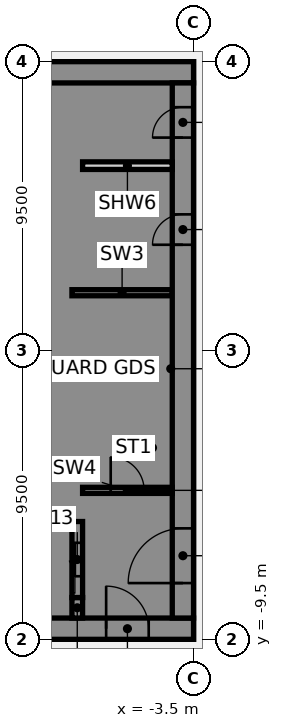
"""IFC4 building model, lengths in metres.
Left out: names, types, materials, properties, quantities, classifications, styles, units other than length and angle.
Written with IfcOpenShell. Run it as: python <this file> out.ifc"""

import sys

from ifc_helpers import new_model, si_unit, direction, frame, frame_2d, origin, place, context, subcontext, project, spatial, polyline, rectangle, outline, extrude, element, fill, save


model = new_model("IFC4")
c1 = context("Model", 3, precision=1e-05, world=origin(), true_north=direction((0.0, 1.0)))
c2 = subcontext(c1, "Body", "Model", "MODEL_VIEW")
j1 = project(units=[si_unit("LENGTHUNIT", "METRE"), si_unit("PLANEANGLEUNIT", "RADIAN")], contexts=[c1])
p1 = place(None, origin())
s1 = spatial("IfcSite", under=j1, at=p1, CompositionType="ELEMENT")
p2 = place(p1, origin())
s2 = spatial("IfcBuilding", under=s1, at=p2, CompositionType="ELEMENT")
p3 = place(p2, frame((0.0, 0.0, 60.25)))
s3 = spatial("IfcBuildingStorey", under=s2, at=p3, CompositionType="ELEMENT", Elevation=60.25)
p4 = place(p3, frame((-16.5, -9.15, 0.0), z_axis=(0.0, 0.0, 1.0), x_axis=(1.0, 0.0, 0.0)))
e1 = element("IfcWall", 1, at=p4, inside=s3, PredefinedType="SHEAR", context=c2, shape_type="SweptSolid", body=[
    extrude(rectangle(XDim=13.0, YDim=0.7, at=frame_2d((6.5, 0.0))), origin(), (0.0, 0.0, 1.0), 3.61),
])
p5 = place(p4, frame((4.15, 0.0, 0.0)))
e2 = element("IfcOpeningElement", 2, at=p5, cuts=e1, PredefinedType="OPENING", context=c2, shape_type="SweptSolid", body=[
    extrude(rectangle(XDim=1.4, YDim=2.1, at=frame_2d((0.7, 1.05))), frame((0.0, 0.36, 0.0), z_axis=(0.0, -1.0, 0.0), x_axis=(1.0, 0.0, 0.0)), (0.0, 0.0, 1.0), 0.72),
])
p6 = place(p4, frame((10.125, 0.0, 0.0)))
e3 = element("IfcOpeningElement", 3, at=p6, cuts=e1, PredefinedType="OPENING", context=c2, shape_type="SweptSolid", body=[
    extrude(rectangle(XDim=1.4, YDim=2.1, at=frame_2d((0.7, 1.05))), frame((0.0, 0.36, 0.0), z_axis=(0.0, -1.0, 0.0), x_axis=(1.0, 0.0, 0.0)), (0.0, 0.0, 1.0), 0.72),
])
p7 = place(p3, frame((-16.5, 9.15, 0.0), z_axis=(0.0, 0.0, 1.0), x_axis=(1.0, 0.0, 0.0)))
e4 = element("IfcWall", 4, at=p7, inside=s3, PredefinedType="SHEAR", context=c2, shape_type="SweptSolid", body=[
    extrude(rectangle(XDim=13.0, YDim=0.7, at=frame_2d((6.5, 0.0))), origin(), (0.0, 0.0, 1.0), 3.61),
])
p8 = place(p3, origin())
e5 = element("IfcWall", 5, at=p8, inside=s3, PredefinedType="SHEAR", context=c2, shape_type="SweptSolid", body=[
    extrude(outline(polyline([(-9.8, -5.375), (-9.8, -5.625), (-7.5, -5.625), (-7.15, -5.625), (-7.15, 8.8), (-7.5, 8.8), (-9.8, 8.8), (-9.8, 8.125), (-7.5, 8.125), (-7.5, 5.625), (-9.8, 5.625), (-9.8, 5.375), (-7.5, 5.375), (-7.5, 2.875), (-9.8, 2.875), (-9.8, 2.625), (-7.5, 2.625), (-7.5, 0.125), (-9.8, 0.125), (-9.8, -0.125), (-7.5, -0.125), (-7.5, -2.625), (-9.8, -2.625), (-9.8, -2.875), (-7.5, -2.875), (-7.5, -5.375), (-9.8, -5.375)])), origin(), (0.0, 0.0, 1.0), 3.61),
])
p9 = place(p3, origin())
e6 = element("IfcWall", 6, at=p9, inside=s3, PredefinedType="SHEAR", context=c2, shape_type="SweptSolid", body=[
    extrude(outline(polyline([(-7.5, -8.125), (-9.55, -8.125), (-9.55, -5.625), (-9.8, -5.625), (-9.8, -8.125), (-9.8, -8.8), (-7.5, -8.8), (-7.5, -8.125)])), origin(), (0.0, 0.0, 1.0), 3.61),
])
p10 = place(p3, frame((-7.325, -8.8, 0.0), z_axis=(0.0, 0.0, 1.0), x_axis=(0.0, 1.0, 0.0)))
e7 = element("IfcWall", 7, at=p10, inside=s3, PredefinedType="SHEAR", context=c2, shape_type="SweptSolid", body=[
    extrude(rectangle(XDim=0.675, YDim=0.35, at=frame_2d((0.337, 0.0))), origin(), (0.0, 0.0, 1.0), 3.61),
])
p11 = place(p3, frame((-7.5, 1.9, 0.0), z_axis=(0.0, 0.0, 1.0), x_axis=(1.0, 0.0, 0.0)))
e8 = element("IfcWall", 8, at=p11, inside=s3, PredefinedType="SHEAR", context=c2, shape_type="SweptSolid", body=[
    extrude(rectangle(XDim=3.3, YDim=0.2, at=frame_2d((1.65, 0.0))), origin(), (0.0, 0.0, 1.0), 3.61),
])
p12 = place(p3, frame((-7.325, -8.125, 0.0), z_axis=(0.0, 0.0, 1.0), x_axis=(0.0, 1.0, 0.0)))
e9 = element("IfcWall", 9, at=p12, inside=s3, PredefinedType="SHEAR", context=c2, shape_type="SweptSolid", body=[
    extrude(rectangle(XDim=2.5, YDim=0.35, at=frame_2d((1.25, 0.0))), origin(), (0.0, 0.0, 1.0), 3.61),
])
p13 = place(p12, frame((0.7, 0.0, 0.0)))
e10 = element("IfcOpeningElement", 10, at=p13, cuts=e9, PredefinedType="OPENING", context=c2, shape_type="SweptSolid", body=[
    extrude(rectangle(XDim=1.1, YDim=2.1, at=frame_2d((0.55, 1.05))), frame((0.0, 0.185, 0.0), z_axis=(0.0, -1.0, 0.0), x_axis=(1.0, 0.0, 0.0)), (0.0, 0.0, 1.0), 0.37),
])
p14 = place(p3, frame((-3.85, -8.8, 0.0), z_axis=(0.0, 0.0, 1.0), x_axis=(0.0, 1.0, 0.0)))
e11 = element("IfcWall", 11, at=p14, inside=s3, PredefinedType="SHEAR", context=c2, shape_type="SweptSolid", body=[
    extrude(rectangle(XDim=17.6, YDim=0.7, at=frame_2d((8.8, 0.0))), origin(), (0.0, 0.0, 1.0), 3.61),
])
p15 = place(p14, frame((1.15, 0.0, 0.0)))
e12 = element("IfcOpeningElement", 12, at=p15, cuts=e11, PredefinedType="OPENING", context=c2, shape_type="SweptSolid", body=[
    extrude(rectangle(XDim=1.8, YDim=2.1, at=frame_2d((0.9, 1.05))), frame((0.0, 0.36, 0.0), z_axis=(0.0, -1.0, 0.0), x_axis=(1.0, 0.0, 0.0)), (0.0, 0.0, 1.0), 0.72),
])
p16 = place(p14, frame((12.278, 0.0, 0.0)))
e13 = element("IfcOpeningElement", 13, at=p16, cuts=e11, PredefinedType="OPENING", context=c2, shape_type="SweptSolid", body=[
    extrude(rectangle(XDim=1.0, YDim=2.1, at=frame_2d((0.5, 1.05))), frame((0.0, 0.36, 0.0), z_axis=(0.0, -1.0, 0.0), x_axis=(1.0, 0.0, 0.0)), (0.0, 0.0, 1.0), 0.72),
])
p17 = place(p14, frame((15.802, 0.0, 0.0)))
e14 = element("IfcOpeningElement", 14, at=p17, cuts=e11, PredefinedType="OPENING", context=c2, shape_type="SweptSolid", body=[
    extrude(rectangle(XDim=1.0, YDim=2.1, at=frame_2d((0.5, 1.05))), frame((0.0, 0.36, 0.0), z_axis=(0.0, -1.0, 0.0), x_axis=(1.0, 0.0, 0.0)), (0.0, 0.0, 1.0), 0.72),
])
p18 = place(p3, frame((-7.15, 6.08, 0.0), z_axis=(0.0, 0.0, 1.0), x_axis=(1.0, 0.0, 0.0)))
e15 = element("IfcWall", 15, at=p18, inside=s3, PredefinedType="PARTITIONING", context=c2, shape_type="SweptSolid", body=[
    extrude(rectangle(XDim=2.95, YDim=0.25, at=frame_2d((1.475, 0.0))), origin(), (0.0, 0.0, 1.0), 3.61),
])
p19 = place(p3, frame((-7.15, -4.6, 0.0), z_axis=(0.0, 0.0, 1.0), x_axis=(1.0, 0.0, 0.0)))
e16 = element("IfcWall", 16, at=p19, inside=s3, PredefinedType="SHEAR", context=c2, shape_type="SweptSolid", body=[
    extrude(rectangle(XDim=2.95, YDim=0.2, at=frame_2d((1.475, 0.0))), origin(), (0.0, 0.0, 1.0), 3.61),
])
p20 = place(p19, frame((0.925, 0.0, 0.0)))
e17 = element("IfcOpeningElement", 17, at=p20, cuts=e16, PredefinedType="OPENING", context=c2, shape_type="SweptSolid", body=[
    extrude(rectangle(XDim=1.1, YDim=2.1, at=frame_2d((0.55, 1.05))), frame((0.0, 0.11, 0.0), z_axis=(0.0, -1.0, 0.0), x_axis=(1.0, 0.0, 0.0)), (0.0, 0.0, 1.0), 0.22),
])
p21 = place(p6, origin())
e18 = element("IfcDoor", 18, at=p21, inside=s3, OperationType="SINGLE_SWING_LEFT", PredefinedType="DOOR", context=c2, shape_type="SweptSolid", body=[
    extrude(rectangle(XDim=1.4, YDim=2.1, at=frame_2d((0.7, 1.05))), frame((0.0, 0.025, 0.0), z_axis=(0.0, -1.0, 0.0), x_axis=(1.0, 0.0, 0.0)), (0.0, 0.0, 1.0), 0.05),
])
fill(e3, e18)
p22 = place(p15, origin())
e19 = element("IfcDoor", 19, at=p22, inside=s3, OperationType="SINGLE_SWING_LEFT", PredefinedType="DOOR", context=c2, shape_type="SweptSolid", body=[
    extrude(rectangle(XDim=1.8, YDim=2.1, at=frame_2d((0.9, 1.05))), frame((0.0, 0.025, 0.0), z_axis=(0.0, -1.0, 0.0), x_axis=(1.0, 0.0, 0.0)), (0.0, 0.0, 1.0), 0.05),
])
fill(e12, e19)
p23 = place(p16, origin())
e20 = element("IfcDoor", 20, at=p23, inside=s3, OperationType="SINGLE_SWING_LEFT", PredefinedType="DOOR", context=c2, shape_type="SweptSolid", body=[
    extrude(rectangle(XDim=1.0, YDim=2.1, at=frame_2d((0.5, 1.05))), frame((0.0, 0.325, 0.0), z_axis=(0.0, -1.0, 0.0), x_axis=(1.0, 0.0, 0.0)), (0.0, 0.0, 1.0), 0.05),
])
fill(e13, e20)
p24 = place(p17, origin())
e21 = element("IfcDoor", 21, at=p24, inside=s3, OperationType="SINGLE_SWING_LEFT", PredefinedType="DOOR", context=c2, shape_type="SweptSolid", body=[
    extrude(rectangle(XDim=1.0, YDim=2.1, at=frame_2d((0.5, 1.05))), frame((0.0, 0.325, 0.0), z_axis=(0.0, -1.0, 0.0), x_axis=(1.0, 0.0, 0.0)), (0.0, 0.0, 1.0), 0.05),
])
fill(e14, e21)
p25 = place(p20, origin())
e22 = element("IfcDoor", 22, at=p25, inside=s3, OperationType="SINGLE_SWING_LEFT", PredefinedType="DOOR", context=c2, shape_type="SweptSolid", body=[
    extrude(rectangle(XDim=1.1, YDim=2.1, at=frame_2d((0.55, 1.05))), frame((0.0, 0.025, 0.0), z_axis=(0.0, -1.0, 0.0), x_axis=(1.0, 0.0, 0.0)), (0.0, 0.0, 1.0), 0.05),
])
fill(e17, e22)
p26 = place(p13, origin())
e23 = element("IfcDoor", 23, at=p26, inside=s3, OperationType="SLIDING_TO_LEFT", PredefinedType="DOOR", context=c2, shape_type="SweptSolid", body=[
    extrude(rectangle(XDim=1.1, YDim=2.1, at=frame_2d((0.55, 1.05))), frame((0.0, 0.025, 0.0), z_axis=(0.0, -1.0, 0.0), x_axis=(1.0, 0.0, 0.0)), (0.0, 0.0, 1.0), 0.05),
])
fill(e10, e23)
save(model, sys.argv[1])
